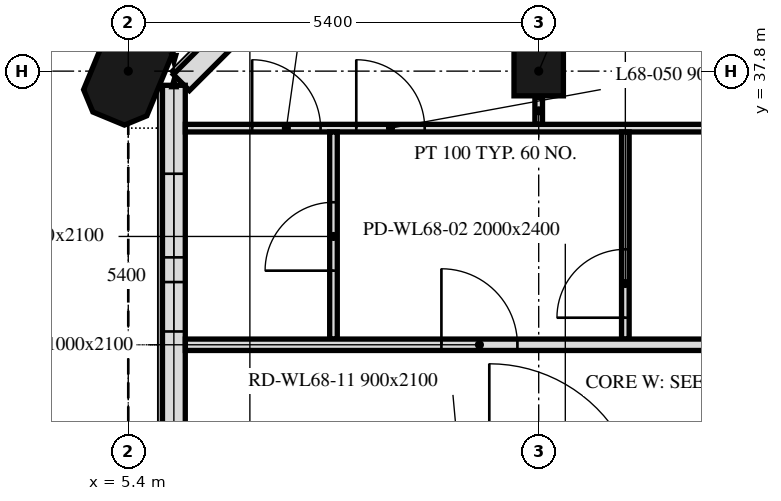
"""IFC4 building model, lengths in metres.
Left out: names, types, materials, properties, quantities, classifications, styles, units other than length and angle.
Written with IfcOpenShell. Run it as: python <this file> out.ifc"""

import sys

from ifc_helpers import new_model, si_unit, direction, frame, frame_2d, origin, origin_2d, place, context, subcontext, project, spatial, polyline, rectangle, outline, extrude, element, fill, save


model = new_model("IFC4")
c1 = context("Model", 3, precision=1e-05, world=origin(), true_north=direction((0.0, 1.0)))
c2 = subcontext(c1, "Body", "Model", "MODEL_VIEW")
j1 = project(units=[si_unit("LENGTHUNIT", "METRE"), si_unit("PLANEANGLEUNIT", "RADIAN")], contexts=[c1])
p1 = place(None, origin())
s1 = spatial("IfcSite", under=j1, at=p1, CompositionType="ELEMENT")
p2 = place(p1, origin())
s2 = spatial("IfcBuilding", under=s1, at=p2, CompositionType="ELEMENT")
p3 = place(p2, frame((0.0, 0.0, 278.5)))
s3 = spatial("IfcBuildingStorey", under=s2, at=p3, CompositionType="ELEMENT", Elevation=278.5)
p4 = place(p3, frame((5.4, 37.8, 0.0), z_axis=(0.0, 0.0, 1.0), x_axis=(0.382683432365, 0.923879532511, 0.0)))
e1 = element("IfcColumn", 1, at=p4, inside=s3, PredefinedType="COLUMN", context=c2, shape_type="SweptSolid", body=[
    extrude(outline(polyline([(-0.45, -0.45), (0.45, -0.45), (0.675, -0.225), (0.675, 0.225), (0.45, 0.45), (-0.45, 0.45), (-0.675, 0.225), (-0.675, -0.225), (-0.45, -0.45)])), origin(), (0.0, 0.0, 1.0), 3.0),
])
p5 = place(p3, frame((10.8, 37.8, 0.0), z_axis=(0.0, 0.0, 1.0), x_axis=(1.0, 0.0, 0.0)))
e2 = element("IfcColumn", 2, at=p5, inside=s3, PredefinedType="COLUMN", context=c2, shape_type="SweptSolid", body=[
    extrude(rectangle(XDim=0.65, YDim=0.65, at=origin_2d()), origin(), (0.0, 0.0, 1.0), 3.0),
])
p6 = place(p3, frame((10.949, 42.501, 0.0), z_axis=(0.0, 0.0, 1.0), x_axis=(-0.707106781187, -0.707106781187, 0.0)))
e3 = element("IfcWall", 3, at=p6, inside=s3, PredefinedType="SOLIDWALL", context=c2, shape_type="SweptSolid", body=[
    extrude(rectangle(XDim=6.86, YDim=0.3, at=frame_2d((3.43, 0.0))), origin(), (0.0, 0.0, 1.0), 3.0),
])
p7 = place(p6, frame((1.73, 0.0, 0.9)))
e4 = element("IfcOpeningElement", 4, at=p7, cuts=e3, PredefinedType="OPENING", context=c2, shape_type="SweptSolid", body=[
    extrude(rectangle(XDim=3.4, YDim=1.7, at=frame_2d((1.7, 0.85))), frame((0.0, 0.16, 0.0), z_axis=(0.0, -1.0, 0.0), x_axis=(1.0, 0.0, 0.0)), (0.0, 0.0, 1.0), 0.32),
])
p8 = place(p3, frame((6.0, 37.614, 0.0), z_axis=(0.0, 0.0, 1.0), x_axis=(0.0, -1.0, 0.0)))
e5 = element("IfcWall", 5, at=p8, inside=s3, PredefinedType="SOLIDWALL", context=c2, shape_type="SweptSolid", body=[
    extrude(rectangle(XDim=5.214, YDim=0.3, at=frame_2d((2.607, 0.0))), origin(), (0.0, 0.0, 1.0), 3.0),
])
p9 = place(p8, frame((1.164, 0.0, 0.9)))
e6 = element("IfcOpeningElement", 6, at=p9, cuts=e5, PredefinedType="OPENING", context=c2, shape_type="SweptSolid", body=[
    extrude(rectangle(XDim=1.1, YDim=1.7, at=frame_2d((0.55, 0.85))), frame((0.0, 0.16, 0.0), z_axis=(0.0, -1.0, 0.0), x_axis=(1.0, 0.0, 0.0)), (0.0, 0.0, 1.0), 0.32),
])
p10 = place(p8, frame((2.589, 0.0, 0.9)))
e7 = element("IfcOpeningElement", 7, at=p10, cuts=e5, PredefinedType="OPENING", context=c2, shape_type="SweptSolid", body=[
    extrude(rectangle(XDim=0.65, YDim=1.7, at=frame_2d((0.325, 0.85))), frame((0.0, 0.16, 0.0), z_axis=(0.0, -1.0, 0.0), x_axis=(1.0, 0.0, 0.0)), (0.0, 0.0, 1.0), 0.32),
])
p11 = place(p3, frame((10.8, 37.1, 0.0), z_axis=(0.0, 0.0, 1.0), x_axis=(0.0, 1.0, 0.0)))
e8 = element("IfcWall", 8, at=p11, inside=s3, PredefinedType="PARTITIONING", context=c2, shape_type="SweptSolid", body=[
    extrude(rectangle(XDim=0.355, YDim=0.1, at=frame_2d((0.177, 0.0))), origin(), (0.0, 0.0, 1.0), 3.0),
])
p12 = place(p3, frame((6.151, 37.05, 0.0), z_axis=(0.0, 0.0, 1.0), x_axis=(1.0, 0.0, 0.0)))
e9 = element("IfcWall", 9, at=p12, inside=s3, PredefinedType="PARTITIONING", context=c2, shape_type="SweptSolid", body=[
    extrude(rectangle(XDim=9.974, YDim=0.1, at=frame_2d((4.987, 0.0))), origin(), (0.0, 0.0, 1.0), 3.0),
])
p13 = place(p12, frame((8.039, 0.0, 0.0)))
e10 = element("IfcOpeningElement", 10, at=p13, cuts=e9, PredefinedType="OPENING", context=c2, shape_type="SweptSolid", body=[
    extrude(rectangle(XDim=0.9, YDim=2.1, at=frame_2d((0.45, 1.05))), frame((0.0, 0.05, 0.0), z_axis=(0.0, -1.0, 0.0), x_axis=(1.0, 0.0, 0.0)), (0.0, 0.0, 1.0), 0.1),
])
p14 = place(p12, frame((0.879, 0.0, 0.0)))
e11 = element("IfcOpeningElement", 11, at=p14, cuts=e9, PredefinedType="OPENING", context=c2, shape_type="SweptSolid", body=[
    extrude(rectangle(XDim=0.9, YDim=2.1, at=frame_2d((0.45, 1.05))), frame((0.0, 0.05, 0.0), z_axis=(0.0, -1.0, 0.0), x_axis=(1.0, 0.0, 0.0)), (0.0, 0.0, 1.0), 0.1),
])
p15 = place(p12, frame((2.249, 0.0, 0.0)))
e12 = element("IfcOpeningElement", 12, at=p15, cuts=e9, PredefinedType="OPENING", context=c2, shape_type="SweptSolid", body=[
    extrude(rectangle(XDim=0.9, YDim=2.1, at=frame_2d((0.45, 1.05))), frame((0.0, 0.05, 0.0), z_axis=(0.0, -1.0, 0.0), x_axis=(1.0, 0.0, 0.0)), (0.0, 0.0, 1.0), 0.1),
])
p16 = place(p3, frame((8.1, 34.275, 0.0), z_axis=(0.0, 0.0, 1.0), x_axis=(0.0, 1.0, 0.0)))
e13 = element("IfcWall", 13, at=p16, inside=s3, PredefinedType="PARTITIONING", context=c2, shape_type="SweptSolid", body=[
    extrude(rectangle(XDim=2.725, YDim=0.1, at=frame_2d((1.363, 0.0))), origin(), (0.0, 0.0, 1.0), 3.0),
])
p17 = place(p16, frame((0.9, 0.0, 0.0)))
e14 = element("IfcOpeningElement", 14, at=p17, cuts=e13, PredefinedType="OPENING", context=c2, shape_type="SweptSolid", body=[
    extrude(rectangle(XDim=0.9, YDim=2.1, at=frame_2d((0.45, 1.05))), frame((0.0, 0.05, 0.0), z_axis=(0.0, -1.0, 0.0), x_axis=(1.0, 0.0, 0.0)), (0.0, 0.0, 1.0), 0.1),
])
p18 = place(p3, frame((11.94, 34.275, 0.0), z_axis=(0.0, 0.0, 1.0), x_axis=(0.0, 1.0, 0.0)))
e15 = element("IfcWall", 15, at=p18, inside=s3, PredefinedType="PARTITIONING", context=c2, shape_type="SweptSolid", body=[
    extrude(rectangle(XDim=2.725, YDim=0.1, at=frame_2d((1.363, 0.0))), origin(), (0.0, 0.0, 1.0), 3.0),
])
p19 = place(p18, frame((0.281, 0.0, 0.0)))
e16 = element("IfcOpeningElement", 16, at=p19, cuts=e15, PredefinedType="OPENING", context=c2, shape_type="SweptSolid", body=[
    extrude(rectangle(XDim=0.9, YDim=2.1, at=frame_2d((0.45, 1.05))), frame((0.0, 0.05, 0.0), z_axis=(0.0, -1.0, 0.0), x_axis=(1.0, 0.0, 0.0)), (0.0, 0.0, 1.0), 0.1),
])
p20 = place(p3, frame((6.151, 34.2, 0.0), z_axis=(0.0, 0.0, 1.0), x_axis=(1.0, 0.0, 0.0)))
e17 = element("IfcWall", 17, at=p20, inside=s3, PredefinedType="PARTITIONING", context=c2, shape_type="SweptSolid", body=[
    extrude(rectangle(XDim=41.698, YDim=0.15, at=frame_2d((20.849, 0.0))), origin(), (0.0, 0.0, 1.0), 3.0),
])
p21 = place(p20, frame((3.369, 0.0, 0.0)))
e18 = element("IfcOpeningElement", 18, at=p21, cuts=e17, PredefinedType="OPENING", context=c2, shape_type="SweptSolid", body=[
    extrude(rectangle(XDim=1.0, YDim=2.1, at=frame_2d((0.5, 1.05))), frame((0.0, 0.075, 0.0), z_axis=(0.0, -1.0, 0.0), x_axis=(1.0, 0.0, 0.0)), (0.0, 0.0, 1.0), 0.15),
])
p22 = place(p20, frame((12.483, 0.0, 0.0)))
e19 = element("IfcOpeningElement", 19, at=p22, cuts=e17, PredefinedType="OPENING", context=c2, shape_type="SweptSolid", body=[
    extrude(rectangle(XDim=1.0, YDim=2.1, at=frame_2d((0.5, 1.05))), frame((0.0, 0.075, 0.0), z_axis=(0.0, -1.0, 0.0), x_axis=(1.0, 0.0, 0.0)), (0.0, 0.0, 1.0), 0.15),
])
p23 = place(p20, frame((24.572, 0.0, 0.0)))
e20 = element("IfcOpeningElement", 20, at=p23, cuts=e17, PredefinedType="OPENING", context=c2, shape_type="SweptSolid", body=[
    extrude(rectangle(XDim=1.0, YDim=2.1, at=frame_2d((0.5, 1.05))), frame((0.0, 0.075, 0.0), z_axis=(0.0, -1.0, 0.0), x_axis=(1.0, 0.0, 0.0)), (0.0, 0.0, 1.0), 0.15),
])
p24 = place(p20, frame((35.849, 0.0, 0.0)))
e21 = element("IfcOpeningElement", 21, at=p24, cuts=e17, PredefinedType="OPENING", context=c2, shape_type="SweptSolid", body=[
    extrude(rectangle(XDim=1.0, YDim=2.1, at=frame_2d((0.5, 1.05))), frame((0.0, 0.075, 0.0), z_axis=(0.0, -1.0, 0.0), x_axis=(1.0, 0.0, 0.0)), (0.0, 0.0, 1.0), 0.15),
])
p25 = place(p9, origin())
e22 = element("IfcWindow", 22, at=p25, inside=s3, PartitioningType="SINGLE_PANEL", PredefinedType="WINDOW", context=c2, shape_type="SweptSolid", body=[
    extrude(rectangle(XDim=1.1, YDim=1.7, at=frame_2d((0.55, 0.85))), frame((0.0, 0.03, 0.0), z_axis=(0.0, -1.0, 0.0), x_axis=(1.0, 0.0, 0.0)), (0.0, 0.0, 1.0), 0.06),
])
fill(e6, e22)
p26 = place(p10, origin())
e23 = element("IfcWindow", 23, at=p26, inside=s3, PartitioningType="SINGLE_PANEL", PredefinedType="WINDOW", context=c2, shape_type="SweptSolid", body=[
    extrude(rectangle(XDim=0.65, YDim=1.7, at=frame_2d((0.325, 0.85))), frame((0.0, 0.03, 0.0), z_axis=(0.0, -1.0, 0.0), x_axis=(1.0, 0.0, 0.0)), (0.0, 0.0, 1.0), 0.06),
])
fill(e7, e23)
p27 = place(p19, origin())
e24 = element("IfcDoor", 24, at=p27, inside=s3, OperationType="SINGLE_SWING_LEFT", PredefinedType="DOOR", context=c2, shape_type="SweptSolid", body=[
    extrude(rectangle(XDim=0.9, YDim=2.1, at=frame_2d((0.45, 1.05))), frame((0.0, 0.025, 0.0), z_axis=(0.0, -1.0, 0.0), x_axis=(1.0, 0.0, 0.0)), (0.0, 0.0, 1.0), 0.05),
])
fill(e16, e24)
p28 = place(p14, origin())
e25 = element("IfcDoor", 25, at=p28, inside=s3, OperationType="SINGLE_SWING_RIGHT", PredefinedType="DOOR", context=c2, shape_type="SweptSolid", body=[
    extrude(rectangle(XDim=0.9, YDim=2.1, at=frame_2d((0.45, 1.05))), frame((0.0, 0.025, 0.0), z_axis=(0.0, -1.0, 0.0), x_axis=(1.0, 0.0, 0.0)), (0.0, 0.0, 1.0), 0.05),
])
fill(e11, e25)
p29 = place(p17, origin())
e26 = element("IfcDoor", 26, at=p29, inside=s3, OperationType="SINGLE_SWING_LEFT", PredefinedType="DOOR", context=c2, shape_type="SweptSolid", body=[
    extrude(rectangle(XDim=0.9, YDim=2.1, at=frame_2d((0.45, 1.05))), frame((0.0, 0.025, 0.0), z_axis=(0.0, -1.0, 0.0), x_axis=(1.0, 0.0, 0.0)), (0.0, 0.0, 1.0), 0.05),
])
fill(e14, e26)
p30 = place(p15, origin())
e27 = element("IfcDoor", 27, at=p30, inside=s3, OperationType="SINGLE_SWING_LEFT", PredefinedType="DOOR", context=c2, shape_type="SweptSolid", body=[
    extrude(rectangle(XDim=0.9, YDim=2.1, at=frame_2d((0.45, 1.05))), frame((0.0, 0.025, 0.0), z_axis=(0.0, -1.0, 0.0), x_axis=(1.0, 0.0, 0.0)), (0.0, 0.0, 1.0), 0.05),
])
fill(e12, e27)
p31 = place(p21, origin())
e28 = element("IfcDoor", 28, at=p31, inside=s3, OperationType="SINGLE_SWING_RIGHT", PredefinedType="DOOR", context=c2, shape_type="SweptSolid", body=[
    extrude(rectangle(XDim=1.0, YDim=2.1, at=frame_2d((0.5, 1.05))), frame((0.0, 0.025, 0.0), z_axis=(0.0, -1.0, 0.0), x_axis=(1.0, 0.0, 0.0)), (0.0, 0.0, 1.0), 0.05),
])
fill(e18, e28)
save(model, sys.argv[1])
